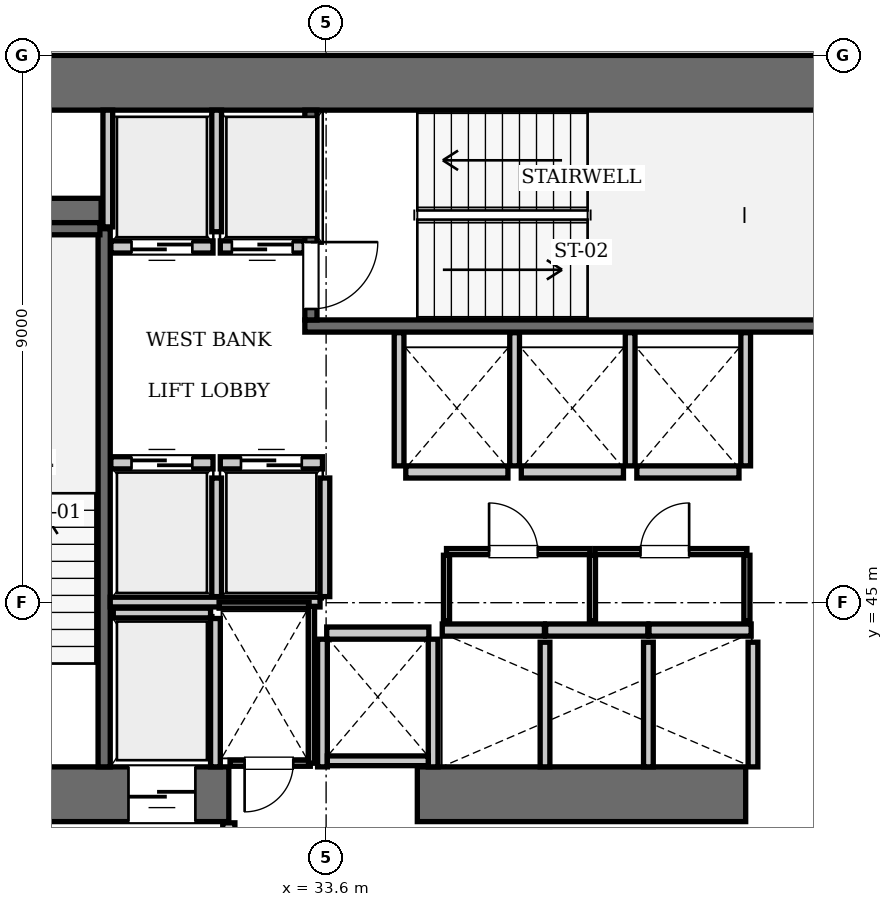
"""IFC4 building model, lengths in metres.
Left out: names, types, materials, properties, quantities, classifications, styles, units other than length and angle.
Written with IfcOpenShell. Run it as: python <this file> out.ifc"""

import sys

from ifc_helpers import new_model, si_unit, direction, frame, frame_2d, origin, place, context, subcontext, project, spatial, rectangle, extrude, element, fill, save


model = new_model("IFC4")
c1 = context("Model", 3, precision=1e-05, world=origin(), true_north=direction((0.0, 1.0)))
c2 = subcontext(c1, "Body", "Model", "MODEL_VIEW")
j1 = project(units=[si_unit("LENGTHUNIT", "METRE"), si_unit("PLANEANGLEUNIT", "RADIAN")], contexts=[c1])
p1 = place(None, origin())
s1 = spatial("IfcSite", under=j1, at=p1, CompositionType="ELEMENT")
p2 = place(p1, origin())
s2 = spatial("IfcBuilding", under=s1, at=p2, CompositionType="ELEMENT")
p3 = place(p2, frame((0.0, 0.0, 73.15)))
s3 = spatial("IfcBuildingStorey", under=s2, at=p3, CompositionType="ELEMENT", Elevation=73.15)
p4 = place(p3, frame((25.2, 53.55, 0.0), z_axis=(0.0, 0.0, 1.0), x_axis=(1.0, 0.0, 0.0)))
e1 = element("IfcWall", 1, at=p4, inside=s3, PredefinedType="SHEAR", context=c2, shape_type="SweptSolid", body=[
    extrude(rectangle(XDim=25.2, YDim=0.9, at=frame_2d((12.6, 0.0))), origin(), (0.0, 0.0, 1.0), 3.85),
])
p5 = place(p3, frame((25.2, 41.85, 0.0), z_axis=(0.0, 0.0, 1.0), x_axis=(1.0, 0.0, 0.0)))
e2 = element("IfcWall", 2, at=p5, inside=s3, PredefinedType="SHEAR", context=c2, shape_type="SweptSolid", body=[
    extrude(rectangle(XDim=6.8, YDim=0.9, at=frame_2d((3.4, 0.0))), origin(), (0.0, 0.0, 1.0), 3.85),
])
p6 = place(p5, frame((1.65, 0.0, 0.0)))
e3 = element("IfcOpeningElement", 3, at=p6, cuts=e2, PredefinedType="OPENING", context=c2, shape_type="SweptSolid", body=[
    extrude(rectangle(XDim=1.15, YDim=2.15, at=frame_2d((0.575, 1.075))), frame((0.0, 0.46, 0.0), z_axis=(0.0, -1.0, 0.0), x_axis=(1.0, 0.0, 0.0)), (0.0, 0.0, 1.0), 0.92),
])
p7 = place(p5, frame((5.15, 0.0, 0.0)))
e4 = element("IfcOpeningElement", 4, at=p7, cuts=e2, PredefinedType="OPENING", context=c2, shape_type="SweptSolid", body=[
    extrude(rectangle(XDim=1.1, YDim=2.2, at=frame_2d((0.55, 1.1))), frame((0.0, 0.46, 0.0), z_axis=(0.0, -1.0, 0.0), x_axis=(1.0, 0.0, 0.0)), (0.0, 0.0, 1.0), 0.92),
])
p8 = place(p3, frame((35.1, 41.85, 0.0), z_axis=(0.0, 0.0, 1.0), x_axis=(1.0, 0.0, 0.0)))
e5 = element("IfcWall", 5, at=p8, inside=s3, PredefinedType="SHEAR", context=c2, shape_type="SweptSolid", body=[
    extrude(rectangle(XDim=5.4, YDim=0.9, at=frame_2d((2.7, 0.0))), origin(), (0.0, 0.0, 1.0), 3.85),
])
p9 = place(p3, frame((26.1, 51.4, 0.0), z_axis=(0.0, 0.0, 1.0), x_axis=(1.0, 0.0, 0.0)))
e6 = element("IfcWall", 6, at=p9, inside=s3, PredefinedType="SHEAR", context=c2, shape_type="SweptSolid", body=[
    extrude(rectangle(XDim=3.8, YDim=0.5, at=frame_2d((1.9, 0.0))), origin(), (0.0, 0.0, 1.0), 3.85),
])
p10 = place(p3, frame((29.95, 42.3, 0.0), z_axis=(0.0, 0.0, 1.0), x_axis=(0.0, 1.0, 0.0)))
e7 = element("IfcWall", 7, at=p10, inside=s3, PredefinedType="SOLIDWALL", context=c2, shape_type="SweptSolid", body=[
    extrude(rectangle(XDim=8.85, YDim=0.2, at=frame_2d((4.425, 0.0))), origin(), (0.0, 0.0, 1.0), 3.61),
])
p11 = place(p3, frame((26.38, 51.15, 0.0), z_axis=(0.0, 0.0, 1.0), x_axis=(1.0, 0.0, 0.0)))
e8 = element("IfcWall", 8, at=p11, inside=s3, PredefinedType="SOLIDWALL", context=c2, shape_type="SweptSolid", body=[
    extrude(rectangle(XDim=3.5, YDim=0.2, at=frame_2d((1.75, 0.0))), origin(), (0.0, 0.0, 1.0), 3.61),
])
p12 = place(p3, frame((33.25, 49.55, 0.0), z_axis=(0.0, 0.0, 1.0), x_axis=(1.0, 0.0, 0.0)))
e9 = element("IfcWall", 9, at=p12, inside=s3, PredefinedType="SOLIDWALL", context=c2, shape_type="SweptSolid", body=[
    extrude(rectangle(XDim=9.1, YDim=0.2, at=frame_2d((4.55, 0.0))), origin(), (0.0, 0.0, 1.0), 3.61),
])
p13 = place(p3, frame((33.35, 49.65, 0.0), z_axis=(0.0, 0.0, 1.0), x_axis=(0.0, 1.0, 0.0)))
e10 = element("IfcWall", 10, at=p13, inside=s3, PredefinedType="SOLIDWALL", context=c2, shape_type="SweptSolid", body=[
    extrude(rectangle(XDim=3.45, YDim=0.2, at=frame_2d((1.725, 0.0))), origin(), (0.0, 0.0, 1.0), 3.61),
])
p14 = place(p13, frame((0.18, 0.0, 0.0)))
e11 = element("IfcOpeningElement", 11, at=p14, cuts=e10, PredefinedType="OPENING", context=c2, shape_type="SweptSolid", body=[
    extrude(rectangle(XDim=1.1, YDim=2.15, at=frame_2d((0.55, 1.075))), frame((0.0, 0.11, 0.0), z_axis=(0.0, -1.0, 0.0), x_axis=(1.0, 0.0, 0.0)), (0.0, 0.0, 1.0), 0.22),
])
p15 = place(p3, frame((30.06, 47.3, 0.0), z_axis=(0.0, 0.0, 1.0), x_axis=(1.0, 0.0, 0.0)))
e12 = element("IfcWall", 12, at=p15, inside=s3, PredefinedType="SOLIDWALL", context=c2, shape_type="SweptSolid", body=[
    extrude(rectangle(XDim=1.68, YDim=0.2, at=frame_2d((0.84, 0.0))), origin(), (0.0, 0.0, 1.0), 3.61),
])
p16 = place(p15, frame((0.34, 0.0, 0.0)))
e13 = element("IfcOpeningElement", 13, at=p16, cuts=e12, PredefinedType="OPENING", context=c2, shape_type="SweptSolid", body=[
    extrude(rectangle(XDim=1.0, YDim=2.15, at=frame_2d((0.5, 1.075))), frame((0.0, 0.11, 0.0), z_axis=(0.0, -1.0, 0.0), x_axis=(1.0, 0.0, 0.0)), (0.0, 0.0, 1.0), 0.22),
])
p17 = place(p3, frame((31.86, 47.3, 0.0), z_axis=(0.0, 0.0, 1.0), x_axis=(1.0, 0.0, 0.0)))
e14 = element("IfcWall", 14, at=p17, inside=s3, PredefinedType="SOLIDWALL", context=c2, shape_type="SweptSolid", body=[
    extrude(rectangle(XDim=1.68, YDim=0.2, at=frame_2d((0.84, 0.0))), origin(), (0.0, 0.0, 1.0), 3.61),
])
p18 = place(p17, frame((0.34, 0.0, 0.0)))
e15 = element("IfcOpeningElement", 15, at=p18, cuts=e14, PredefinedType="OPENING", context=c2, shape_type="SweptSolid", body=[
    extrude(rectangle(XDim=1.0, YDim=2.15, at=frame_2d((0.5, 1.075))), frame((0.0, 0.11, 0.0), z_axis=(0.0, -1.0, 0.0), x_axis=(1.0, 0.0, 0.0)), (0.0, 0.0, 1.0), 0.22),
])
p19 = place(p3, frame((30.06, 50.85, 0.0), z_axis=(0.0, 0.0, 1.0), x_axis=(1.0, 0.0, 0.0)))
e16 = element("IfcWall", 16, at=p19, inside=s3, PredefinedType="SOLIDWALL", context=c2, shape_type="SweptSolid", body=[
    extrude(rectangle(XDim=1.68, YDim=0.2, at=frame_2d((0.84, 0.0))), origin(), (0.0, 0.0, 1.0), 3.61),
])
p20 = place(p19, frame((0.34, 0.0, 0.0)))
e17 = element("IfcOpeningElement", 17, at=p20, cuts=e16, PredefinedType="OPENING", context=c2, shape_type="SweptSolid", body=[
    extrude(rectangle(XDim=1.0, YDim=2.15, at=frame_2d((0.5, 1.075))), frame((0.0, 0.11, 0.0), z_axis=(0.0, -1.0, 0.0), x_axis=(1.0, 0.0, 0.0)), (0.0, 0.0, 1.0), 0.22),
])
p21 = place(p3, frame((31.86, 50.85, 0.0), z_axis=(0.0, 0.0, 1.0), x_axis=(1.0, 0.0, 0.0)))
e18 = element("IfcWall", 18, at=p21, inside=s3, PredefinedType="SOLIDWALL", context=c2, shape_type="SweptSolid", body=[
    extrude(rectangle(XDim=1.38, YDim=0.2, at=frame_2d((0.69, 0.0))), origin(), (0.0, 0.0, 1.0), 3.61),
])
p22 = place(p21, frame((0.19, 0.0, 0.0)))
e19 = element("IfcOpeningElement", 19, at=p22, cuts=e18, PredefinedType="OPENING", context=c2, shape_type="SweptSolid", body=[
    extrude(rectangle(XDim=1.0, YDim=2.15, at=frame_2d((0.5, 1.075))), frame((0.0, 0.11, 0.0), z_axis=(0.0, -1.0, 0.0), x_axis=(1.0, 0.0, 0.0)), (0.0, 0.0, 1.0), 0.22),
])
for number, where, z_axis, x_axis in (
    (20, (35.51, 44.55, 0.0), (0.0, 0.0, 1.0), (1.0, 0.0, 0.0)),
    (21, (37.21, 44.55, 0.0), (0.0, 0.0, 1.0), (1.0, 0.0, 0.0)),
):
    element("IfcWall", number, at=place(p3, frame(where, z_axis=z_axis, x_axis=x_axis)), inside=s3, PredefinedType="SOLIDWALL", context=c2, shape_type="SweptSolid", body=[
        extrude(rectangle(XDim=1.68, YDim=0.2, at=frame_2d((0.84, 0.0))), origin(), (0.0, 0.0, 1.0), 3.61),
    ])
for number, where, z_axis, x_axis in (
    (22, (38.91, 44.55, 0.0), (0.0, 0.0, 1.0), (1.0, 0.0, 0.0)),
    (23, (34.91, 47.15, 0.0), (0.0, 0.0, 1.0), (1.0, 0.0, 0.0)),
):
    element("IfcWall", number, at=place(p3, frame(where, z_axis=z_axis, x_axis=x_axis)), inside=s3, PredefinedType="SOLIDWALL", context=c2, shape_type="SweptSolid", body=[
        extrude(rectangle(XDim=1.68, YDim=0.2, at=frame_2d((0.84, 0.0))), origin(), (0.0, 0.0, 1.0), 3.61),
    ])
for number, where, z_axis, x_axis in (
    (24, (36.81, 47.15, 0.0), (0.0, 0.0, 1.0), (1.0, 0.0, 0.0)),
    (25, (38.71, 47.15, 0.0), (0.0, 0.0, 1.0), (1.0, 0.0, 0.0)),
    (26, (33.61, 44.5, 0.0), (0.0, 0.0, 1.0), (1.0, 0.0, 0.0)),
):
    element("IfcWall", number, at=place(p3, frame(where, z_axis=z_axis, x_axis=x_axis)), inside=s3, PredefinedType="SOLIDWALL", context=c2, shape_type="SweptSolid", body=[
        extrude(rectangle(XDim=1.68, YDim=0.2, at=frame_2d((0.84, 0.0))), origin(), (0.0, 0.0, 1.0), 3.61),
    ])
p23 = place(p3, frame((30.1, 44.83, 0.0), z_axis=(0.0, 0.0, 1.0), x_axis=(1.0, 0.0, 0.0)))
e27 = element("IfcWall", 27, at=p23, inside=s3, PredefinedType="SOLIDWALL", context=c2, shape_type="SweptSolid", body=[
    extrude(rectangle(XDim=1.6, YDim=0.16, at=frame_2d((0.8, 0.0))), origin(), (0.0, 0.0, 1.0), 3.61),
])
p24 = place(p3, frame((31.78, 42.3, 0.0), z_axis=(0.0, 0.0, 1.0), x_axis=(0.0, 1.0, 0.0)))
e28 = element("IfcWall", 28, at=p24, inside=s3, PredefinedType="SOLIDWALL", context=c2, shape_type="SweptSolid", body=[
    extrude(rectangle(XDim=2.44, YDim=0.16, at=frame_2d((1.22, 0.0))), origin(), (0.0, 0.0, 1.0), 3.61),
])
for number, where, z_axis, x_axis in (
    (29, (31.8, 45.1, 0.0), (0.0, 0.0, 1.0), (0.0, 1.0, 0.0)),
    (30, (33.58, 45.1, 0.0), (0.0, 0.0, 1.0), (0.0, 1.0, 0.0)),
):
    element("IfcWall", number, at=place(p3, frame(where, z_axis=z_axis, x_axis=x_axis)), inside=s3, PredefinedType="SOLIDWALL", context=c2, shape_type="SweptSolid", body=[
        extrude(rectangle(XDim=1.95, YDim=0.16, at=frame_2d((0.975, 0.0))), origin(), (0.0, 0.0, 1.0), 3.61),
    ])
p25 = place(p3, frame((30.05, 45.01, 0.0), z_axis=(0.0, 0.0, 1.0), x_axis=(1.0, 0.0, 0.0)))
e31 = element("IfcWall", 31, at=p25, inside=s3, PredefinedType="SOLIDWALL", context=c2, shape_type="SweptSolid", body=[
    extrude(rectangle(XDim=3.45, YDim=0.16, at=frame_2d((1.725, 0.0))), origin(), (0.0, 0.0, 1.0), 3.61),
])
p26 = place(p3, frame((30.01, 51.18, 0.0), z_axis=(0.0, 0.0, 1.0), x_axis=(0.0, 1.0, 0.0)))
e32 = element("IfcWall", 32, at=p26, inside=s3, PredefinedType="SOLIDWALL", context=c2, shape_type="SweptSolid", body=[
    extrude(rectangle(XDim=1.92, YDim=0.16, at=frame_2d((0.96, 0.0))), origin(), (0.0, 0.0, 1.0), 3.61),
])
p27 = place(p3, frame((31.8, 51.1, 0.0), z_axis=(0.0, 0.0, 1.0), x_axis=(0.0, 1.0, 0.0)))
e33 = element("IfcWall", 33, at=p27, inside=s3, PredefinedType="SOLIDWALL", context=c2, shape_type="SweptSolid", body=[
    extrude(rectangle(XDim=2.0, YDim=0.16, at=frame_2d((1.0, 0.0))), origin(), (0.0, 0.0, 1.0), 3.61),
])
for number, where, z_axis, x_axis in (
    (34, (37.2, 42.3, 0.0), (0.0, 0.0, 1.0), (0.0, 1.0, 0.0)),
    (35, (38.9, 42.3, 0.0), (0.0, 0.0, 1.0), (0.0, 1.0, 0.0)),
    (36, (40.62, 42.3, 0.0), (0.0, 0.0, 1.0), (0.0, 1.0, 0.0)),
):
    element("IfcWall", number, at=place(p3, frame(where, z_axis=z_axis, x_axis=x_axis)), inside=s3, PredefinedType="SOLIDWALL", context=c2, shape_type="SweptSolid", body=[
        extrude(rectangle(XDim=2.05, YDim=0.16, at=frame_2d((1.025, 0.0))), origin(), (0.0, 0.0, 1.0), 3.61),
    ])
for number, where, z_axis, x_axis in (
    (37, (34.8, 47.25, 0.0), (0.0, 0.0, 1.0), (0.0, 1.0, 0.0)),
    (38, (36.7, 47.25, 0.0), (0.0, 0.0, 1.0), (0.0, 1.0, 0.0)),
    (39, (38.6, 47.25, 0.0), (0.0, 0.0, 1.0), (0.0, 1.0, 0.0)),
    (40, (40.5, 47.25, 0.0), (0.0, 0.0, 1.0), (0.0, 1.0, 0.0)),
):
    element("IfcWall", number, at=place(p3, frame(where, z_axis=z_axis, x_axis=x_axis)), inside=s3, PredefinedType="SOLIDWALL", context=c2, shape_type="SweptSolid", body=[
        extrude(rectangle(XDim=2.19, YDim=0.16, at=frame_2d((1.095, 0.0))), origin(), (0.0, 0.0, 1.0), 3.61),
    ])
for number, where, z_axis, x_axis in (
    (41, (33.54, 42.3, 0.0), (0.0, 0.0, 1.0), (0.0, 1.0, 0.0)),
    (42, (35.36, 42.3, 0.0), (0.0, 0.0, 1.0), (0.0, 1.0, 0.0)),
):
    element("IfcWall", number, at=place(p3, frame(where, z_axis=z_axis, x_axis=x_axis)), inside=s3, PredefinedType="SOLIDWALL", context=c2, shape_type="SweptSolid", body=[
        extrude(rectangle(XDim=2.1, YDim=0.16, at=frame_2d((1.05, 0.0))), origin(), (0.0, 0.0, 1.0), 3.61),
    ])
p28 = place(p3, frame((33.62, 42.4, 0.0), z_axis=(0.0, 0.0, 1.0), x_axis=(1.0, 0.0, 0.0)))
e43 = element("IfcWall", 43, at=p28, inside=s3, PredefinedType="SOLIDWALL", context=c2, shape_type="SweptSolid", body=[
    extrude(rectangle(XDim=1.66, YDim=0.16, at=frame_2d((0.83, 0.0))), origin(), (0.0, 0.0, 1.0), 3.61),
])
p29 = place(p3, frame((32.0, 38.31, 0.0), z_axis=(0.0, 0.0, 1.0), x_axis=(0.0, 1.0, 0.0)))
e44 = element("IfcWall", 44, at=p29, inside=s3, PredefinedType="PARTITIONING", context=c2, shape_type="SweptSolid", body=[
    extrude(rectangle(XDim=3.07, YDim=0.2, at=frame_2d((1.535, 0.0))), origin(), (0.0, 0.0, 1.0), 3.61),
])
p30 = place(p3, frame((32.02, 42.36, 0.0), z_axis=(0.0, 0.0, 1.0), x_axis=(1.0, 0.0, 0.0)))
e45 = element("IfcWall", 45, at=p30, inside=s3, PredefinedType="PARTITIONING", context=c2, shape_type="SweptSolid", body=[
    extrude(rectangle(XDim=1.32, YDim=0.1, at=frame_2d((0.66, 0.0))), origin(), (0.0, 0.0, 1.0), 3.61),
])
p31 = place(p30, frame((0.24, 0.0, 0.0)))
e46 = element("IfcOpeningElement", 46, at=p31, cuts=e45, PredefinedType="OPENING", context=c2, shape_type="SweptSolid", body=[
    extrude(rectangle(XDim=0.8, YDim=2.05, at=frame_2d((0.4, 1.025))), frame((0.0, 0.06, 0.0), z_axis=(0.0, -1.0, 0.0), x_axis=(1.0, 0.0, 0.0)), (0.0, 0.0, 1.0), 0.12),
])
p32 = place(p3, frame((31.84, 44.96, 0.0), z_axis=(0.0, 0.0, 1.0), x_axis=(1.0, 0.0, 0.0)))
e47 = element("IfcWall", 47, at=p32, inside=s3, PredefinedType="PARTITIONING", context=c2, shape_type="SweptSolid", body=[
    extrude(rectangle(XDim=1.48, YDim=0.1, at=frame_2d((0.74, 0.0))), origin(), (0.0, 0.0, 1.0), 3.61),
])
p33 = place(p3, frame((33.36, 42.36, 0.0), z_axis=(0.0, 0.0, 1.0), x_axis=(0.0, 1.0, 0.0)))
e48 = element("IfcWall", 48, at=p33, inside=s3, PredefinedType="PARTITIONING", context=c2, shape_type="SweptSolid", body=[
    extrude(rectangle(XDim=2.58, YDim=0.1, at=frame_2d((1.29, 0.0))), origin(), (0.0, 0.0, 1.0), 3.61),
])
p34 = place(p3, frame((35.58, 45.84, 0.0), z_axis=(0.0, 0.0, 1.0), x_axis=(1.0, 0.0, 0.0)))
e49 = element("IfcWall", 49, at=p34, inside=s3, PredefinedType="PARTITIONING", context=c2, shape_type="SweptSolid", body=[
    extrude(rectangle(XDim=2.36, YDim=0.1, at=frame_2d((1.18, 0.0))), origin(), (0.0, 0.0, 1.0), 3.61),
])
p35 = place(p34, frame((0.7, 0.0, 0.0)))
e50 = element("IfcOpeningElement", 50, at=p35, cuts=e49, PredefinedType="OPENING", context=c2, shape_type="SweptSolid", body=[
    extrude(rectangle(XDim=0.8, YDim=2.05, at=frame_2d((0.4, 1.025))), frame((0.0, 0.06, 0.0), z_axis=(0.0, -1.0, 0.0), x_axis=(1.0, 0.0, 0.0)), (0.0, 0.0, 1.0), 0.12),
])
p36 = place(p3, frame((38.02, 45.84, 0.0), z_axis=(0.0, 0.0, 1.0), x_axis=(1.0, 0.0, 0.0)))
e51 = element("IfcWall", 51, at=p36, inside=s3, PredefinedType="PARTITIONING", context=c2, shape_type="SweptSolid", body=[
    extrude(rectangle(XDim=2.5, YDim=0.1, at=frame_2d((1.25, 0.0))), origin(), (0.0, 0.0, 1.0), 3.61),
])
p37 = place(p36, frame((0.75, 0.0, 0.0)))
e52 = element("IfcOpeningElement", 52, at=p37, cuts=e51, PredefinedType="OPENING", context=c2, shape_type="SweptSolid", body=[
    extrude(rectangle(XDim=0.8, YDim=2.05, at=frame_2d((0.4, 1.025))), frame((0.0, 0.06, 0.0), z_axis=(0.0, -1.0, 0.0), x_axis=(1.0, 0.0, 0.0)), (0.0, 0.0, 1.0), 0.12),
])
for number, where, z_axis, x_axis in (
    (53, (35.58, 44.7, 0.0), (0.0, 0.0, 1.0), (0.0, 1.0, 0.0)),
    (54, (37.98, 44.7, 0.0), (0.0, 0.0, 1.0), (0.0, 1.0, 0.0)),
    (55, (40.52, 44.7, 0.0), (0.0, 0.0, 1.0), (0.0, 1.0, 0.0)),
):
    element("IfcWall", number, at=place(p3, frame(where, z_axis=z_axis, x_axis=x_axis)), inside=s3, PredefinedType="PARTITIONING", context=c2, shape_type="SweptSolid", body=[
        extrude(rectangle(XDim=1.08, YDim=0.1, at=frame_2d((0.54, 0.0))), origin(), (0.0, 0.0, 1.0), 3.61),
    ])
p38 = place(p14, frame((1.1, 0.0, 0.0), z_axis=(0.0, 0.0, 1.0), x_axis=(-1.0, 0.0, 0.0)))
e56 = element("IfcDoor", 56, at=p38, inside=s3, OperationType="SINGLE_SWING_LEFT", PredefinedType="DOOR", context=c2, shape_type="SweptSolid", body=[
    extrude(rectangle(XDim=1.1, YDim=2.15, at=frame_2d((0.55, 1.075))), frame((0.0, 0.025, 0.0), z_axis=(0.0, -1.0, 0.0), x_axis=(1.0, 0.0, 0.0)), (0.0, 0.0, 1.0), 0.05),
])
fill(e11, e56)
p39 = place(p16, origin())
e57 = element("IfcDoor", 57, at=p39, inside=s3, OperationType="SLIDING_TO_LEFT", PredefinedType="DOOR", context=c2, shape_type="SweptSolid", body=[
    extrude(rectangle(XDim=1.0, YDim=2.15, at=frame_2d((0.5, 1.075))), frame((0.0, 0.025, 0.0), z_axis=(0.0, -1.0, 0.0), x_axis=(1.0, 0.0, 0.0)), (0.0, 0.0, 1.0), 0.05),
])
fill(e13, e57)
p40 = place(p18, origin())
e58 = element("IfcDoor", 58, at=p40, inside=s3, OperationType="SLIDING_TO_LEFT", PredefinedType="DOOR", context=c2, shape_type="SweptSolid", body=[
    extrude(rectangle(XDim=1.0, YDim=2.15, at=frame_2d((0.5, 1.075))), frame((0.0, 0.025, 0.0), z_axis=(0.0, -1.0, 0.0), x_axis=(1.0, 0.0, 0.0)), (0.0, 0.0, 1.0), 0.05),
])
fill(e15, e58)
p41 = place(p20, frame((1.0, 0.0, 0.0), z_axis=(0.0, 0.0, 1.0), x_axis=(-1.0, 0.0, 0.0)))
e59 = element("IfcDoor", 59, at=p41, inside=s3, OperationType="SLIDING_TO_LEFT", PredefinedType="DOOR", context=c2, shape_type="SweptSolid", body=[
    extrude(rectangle(XDim=1.0, YDim=2.15, at=frame_2d((0.5, 1.075))), frame((0.0, 0.025, 0.0), z_axis=(0.0, -1.0, 0.0), x_axis=(1.0, 0.0, 0.0)), (0.0, 0.0, 1.0), 0.05),
])
fill(e17, e59)
p42 = place(p22, frame((1.0, 0.0, 0.0), z_axis=(0.0, 0.0, 1.0), x_axis=(-1.0, 0.0, 0.0)))
e60 = element("IfcDoor", 60, at=p42, inside=s3, OperationType="SLIDING_TO_LEFT", PredefinedType="DOOR", context=c2, shape_type="SweptSolid", body=[
    extrude(rectangle(XDim=1.0, YDim=2.15, at=frame_2d((0.5, 1.075))), frame((0.0, 0.025, 0.0), z_axis=(0.0, -1.0, 0.0), x_axis=(1.0, 0.0, 0.0)), (0.0, 0.0, 1.0), 0.05),
])
fill(e19, e60)
p43 = place(p7, frame((1.1, 0.0, 0.0), z_axis=(0.0, 0.0, 1.0), x_axis=(-1.0, 0.0, 0.0)))
e61 = element("IfcDoor", 61, at=p43, inside=s3, OperationType="SLIDING_TO_LEFT", PredefinedType="DOOR", context=c2, shape_type="SweptSolid", body=[
    extrude(rectangle(XDim=1.1, YDim=2.2, at=frame_2d((0.55, 1.1))), frame((0.0, 0.025, 0.0), z_axis=(0.0, -1.0, 0.0), x_axis=(1.0, 0.0, 0.0)), (0.0, 0.0, 1.0), 0.05),
])
fill(e4, e61)
p44 = place(p31, frame((0.8, 0.0, 0.0), z_axis=(0.0, 0.0, 1.0), x_axis=(-1.0, 0.0, 0.0)))
e62 = element("IfcDoor", 62, at=p44, inside=s3, OperationType="SINGLE_SWING_RIGHT", PredefinedType="DOOR", context=c2, shape_type="SweptSolid", body=[
    extrude(rectangle(XDim=0.8, YDim=2.05, at=frame_2d((0.4, 1.025))), frame((0.0, 0.025, 0.0), z_axis=(0.0, -1.0, 0.0), x_axis=(1.0, 0.0, 0.0)), (0.0, 0.0, 1.0), 0.05),
])
fill(e46, e62)
p45 = place(p35, origin())
e63 = element("IfcDoor", 63, at=p45, inside=s3, OperationType="SINGLE_SWING_LEFT", PredefinedType="DOOR", context=c2, shape_type="SweptSolid", body=[
    extrude(rectangle(XDim=0.8, YDim=2.05, at=frame_2d((0.4, 1.025))), frame((0.0, 0.025, 0.0), z_axis=(0.0, -1.0, 0.0), x_axis=(1.0, 0.0, 0.0)), (0.0, 0.0, 1.0), 0.05),
])
fill(e50, e63)
p46 = place(p37, origin())
e64 = element("IfcDoor", 64, at=p46, inside=s3, OperationType="SINGLE_SWING_RIGHT", PredefinedType="DOOR", context=c2, shape_type="SweptSolid", body=[
    extrude(rectangle(XDim=0.8, YDim=2.05, at=frame_2d((0.4, 1.025))), frame((0.0, 0.025, 0.0), z_axis=(0.0, -1.0, 0.0), x_axis=(1.0, 0.0, 0.0)), (0.0, 0.0, 1.0), 0.05),
])
fill(e52, e64)
save(model, sys.argv[1])
